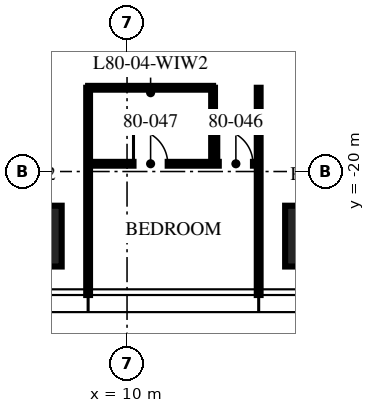
"""IFC4 building model, lengths in metres.
Left out: names, types, materials, properties, quantities, classifications, styles, units other than length and angle.
Written with IfcOpenShell. Run it as: python <this file> out.ifc"""

import sys

from ifc_helpers import new_model, si_unit, direction, frame, frame_2d, origin, origin_2d, place, context, subcontext, project, spatial, rectangle, extrude, element, fill, save


model = new_model("IFC4")
c1 = context("Model", 3, precision=1e-05, world=origin(), true_north=direction((0.0, 1.0)))
c2 = subcontext(c1, "Body", "Model", "MODEL_VIEW")
j1 = project(units=[si_unit("LENGTHUNIT", "METRE"), si_unit("PLANEANGLEUNIT", "RADIAN")], contexts=[c1])
p1 = place(None, origin())
s1 = spatial("IfcSite", under=j1, at=p1, CompositionType="ELEMENT")
p2 = place(p1, origin())
s2 = spatial("IfcBuilding", under=s1, at=p2, CompositionType="ELEMENT")
p3 = place(p2, frame((0.0, 0.0, 319.5)))
s3 = spatial("IfcBuildingStorey", under=s2, at=p3, CompositionType="ELEMENT", Elevation=319.5)
for number, where, z_axis, x_axis in (
    (1, (14.96, -21.7, 0.0), (0.0, 0.0, 1.0), (1.0, 0.0, 0.0)),
    (2, (7.48, -21.7, 0.0), (0.0, 0.0, 1.0), (1.0, 0.0, 0.0)),
):
    element("IfcColumn", number, at=place(p3, frame(where, z_axis=z_axis, x_axis=x_axis)), inside=s3, PredefinedType="COLUMN", context=c2, shape_type="SweptSolid", body=[
        extrude(rectangle(XDim=1.6, YDim=1.6, at=origin_2d()), origin(), (0.0, 0.0, 1.0), 3.75),
    ])
for number, where, z_axis, x_axis in (
    (3, (8.976, -17.796, 0.0), (0.0, 0.0, 1.0), (0.0, -1.0, 0.0)),
    (4, (13.464, -17.796, 0.0), (0.0, 0.0, 1.0), (0.0, -1.0, 0.0)),
):
    element("IfcWall", number, at=place(p3, frame(where, z_axis=z_axis, x_axis=x_axis)), inside=s3, PredefinedType="PARTITIONING", context=c2, shape_type="SweptSolid", body=[
        extrude(rectangle(XDim=5.454, YDim=0.1, at=frame_2d((2.727, 0.0))), origin(), (0.0, 0.0, 1.0), 3.01),
    ])
p4 = place(p3, frame((8.976, -19.796, 0.0), z_axis=(0.0, 0.0, 1.0), x_axis=(1.0, 0.0, 0.0)))
e5 = element("IfcWall", 5, at=p4, inside=s3, PredefinedType="PARTITIONING", context=c2, shape_type="SweptSolid", body=[
    extrude(rectangle(XDim=4.488, YDim=0.1, at=frame_2d((2.244, 0.0))), origin(), (0.0, 0.0, 1.0), 2.91),
])
p5 = place(p4, frame((3.438, 0.0, 0.0)))
e6 = element("IfcOpeningElement", 6, at=p5, cuts=e5, PredefinedType="OPENING", context=c2, shape_type="SweptSolid", body=[
    extrude(rectangle(XDim=0.9, YDim=2.1, at=frame_2d((0.45, 1.05))), frame((0.0, 0.06, 0.0), z_axis=(0.0, -1.0, 0.0), x_axis=(1.0, 0.0, 0.0)), (0.0, 0.0, 1.0), 0.12),
])
p6 = place(p4, frame((1.194, 0.0, 0.0)))
e7 = element("IfcOpeningElement", 7, at=p6, cuts=e5, PredefinedType="OPENING", context=c2, shape_type="SweptSolid", body=[
    extrude(rectangle(XDim=0.9, YDim=2.1, at=frame_2d((0.45, 1.05))), frame((0.0, 0.06, 0.0), z_axis=(0.0, -1.0, 0.0), x_axis=(1.0, 0.0, 0.0)), (0.0, 0.0, 1.0), 0.12),
])
p7 = place(p3, frame((12.264, -17.796, 0.0), z_axis=(0.0, 0.0, 1.0), x_axis=(0.0, -1.0, 0.0)))
e8 = element("IfcWall", 8, at=p7, inside=s3, PredefinedType="PARTITIONING", context=c2, shape_type="SweptSolid", body=[
    extrude(rectangle(XDim=2.0, YDim=0.1, at=frame_2d((1.0, 0.0))), origin(), (0.0, 0.0, 1.0), 3.5),
])
p8 = place(p3, frame((8.976, -17.796, 0.0), z_axis=(0.0, 0.0, 1.0), x_axis=(1.0, 0.0, 0.0)))
e9 = element("IfcWall", 9, at=p8, inside=s3, PredefinedType="PARTITIONING", context=c2, shape_type="SweptSolid", body=[
    extrude(rectangle(XDim=3.288, YDim=0.1, at=frame_2d((1.644, 0.0))), origin(), (0.0, 0.0, 1.0), 2.91),
])
p9 = place(p5, origin())
e10 = element("IfcDoor", 10, at=p9, inside=s3, OperationType="SINGLE_SWING_LEFT", PredefinedType="DOOR", context=c2, shape_type="SweptSolid", body=[
    extrude(rectangle(XDim=0.9, YDim=2.1, at=frame_2d((0.45, 1.05))), frame((0.0, 0.025, 0.0), z_axis=(0.0, -1.0, 0.0), x_axis=(1.0, 0.0, 0.0)), (0.0, 0.0, 1.0), 0.05),
])
fill(e6, e10)
p10 = place(p6, origin())
e11 = element("IfcDoor", 11, at=p10, inside=s3, OperationType="SINGLE_SWING_LEFT", PredefinedType="DOOR", context=c2, shape_type="SweptSolid", body=[
    extrude(rectangle(XDim=0.9, YDim=2.1, at=frame_2d((0.45, 1.05))), frame((0.0, 0.025, 0.0), z_axis=(0.0, -1.0, 0.0), x_axis=(1.0, 0.0, 0.0)), (0.0, 0.0, 1.0), 0.05),
])
fill(e7, e11)
save(model, sys.argv[1])
